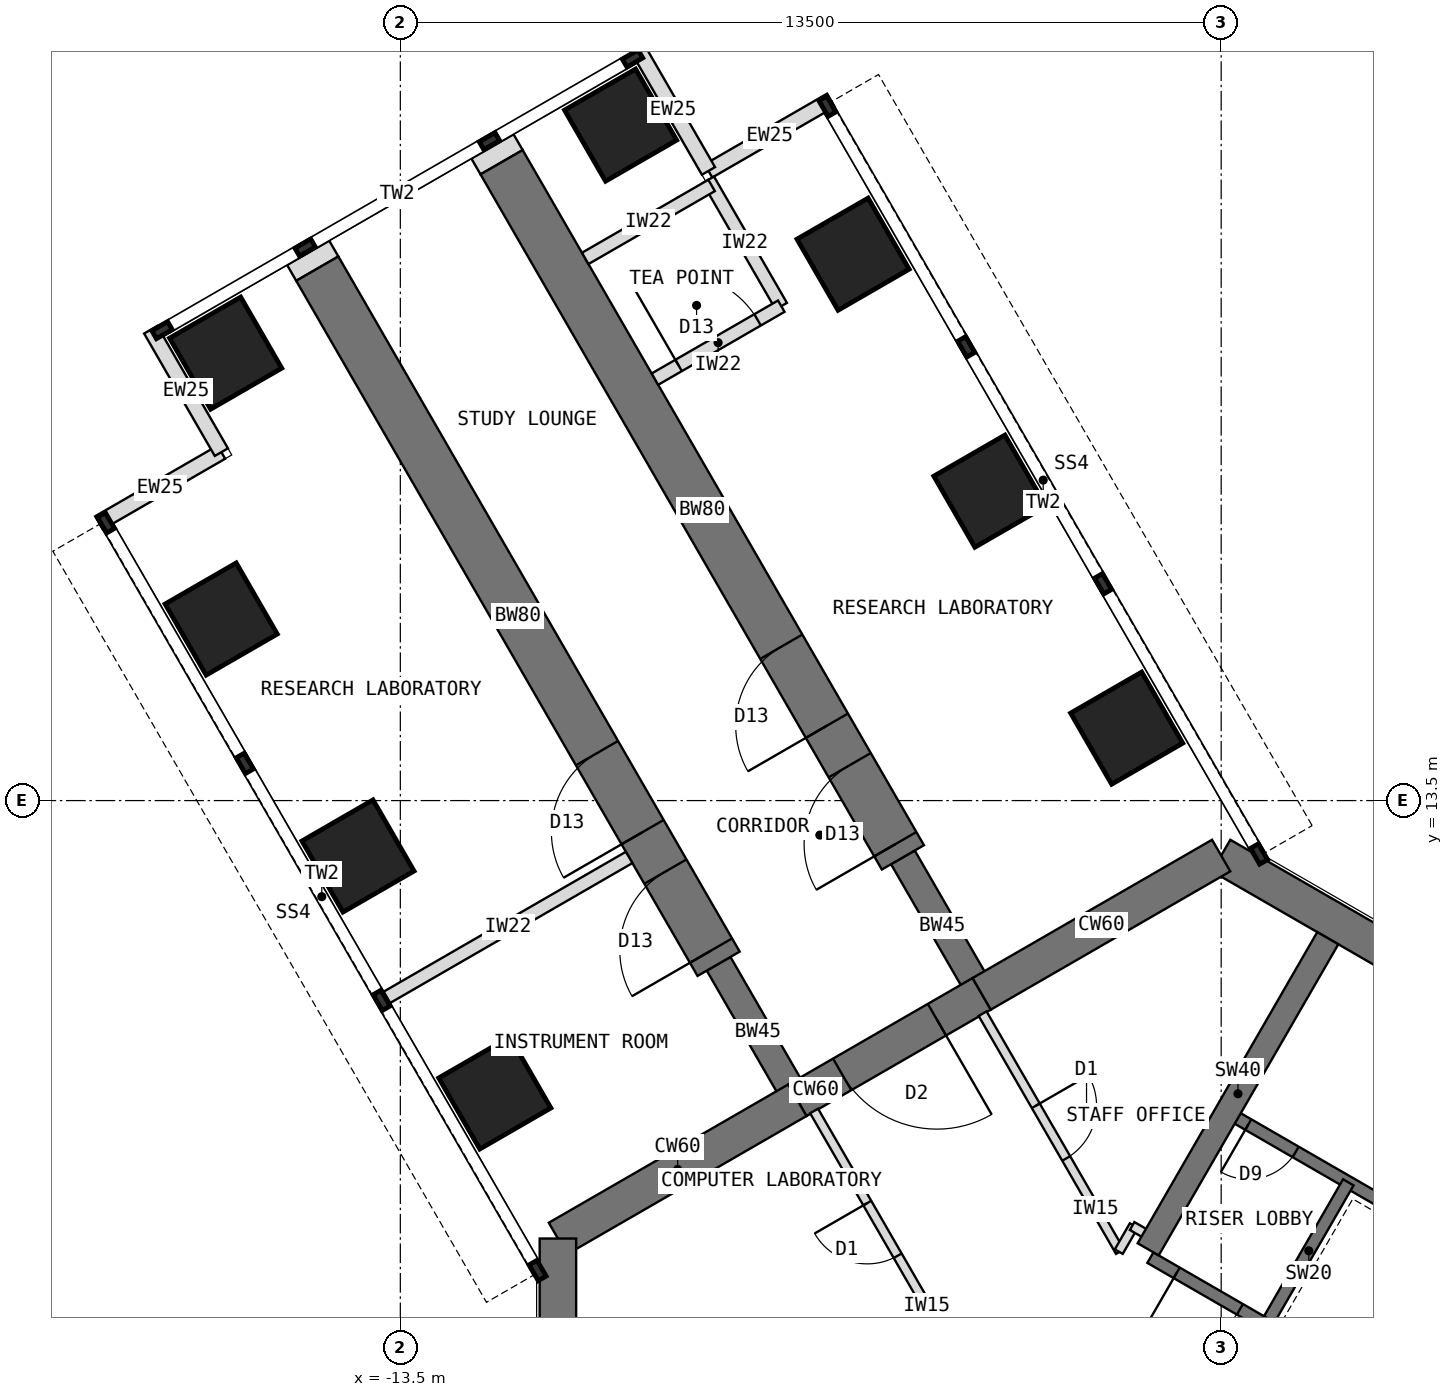
"""IFC4 building model, lengths in metres.
Left out: names, types, materials, properties, quantities, classifications, styles, units other than length and angle.
Written with IfcOpenShell. Run it as: python <this file> out.ifc"""

import sys

from ifc_helpers import new_model, si_unit, direction, frame, frame_2d, origin, origin_2d, place, context, subcontext, project, spatial, rectangle, extrude, element, fill, save


model = new_model("IFC4")
c1 = context("Model", 3, precision=1e-05, world=origin(), true_north=direction((0.0, 1.0)))
c2 = subcontext(c1, "Body", "Model", "MODEL_VIEW")
j1 = project(units=[si_unit("LENGTHUNIT", "METRE"), si_unit("PLANEANGLEUNIT", "RADIAN")], contexts=[c1])
p1 = place(None, origin())
s1 = spatial("IfcSite", under=j1, at=p1, CompositionType="ELEMENT")
p2 = place(p1, origin())
s2 = spatial("IfcBuilding", under=s1, at=p2, CompositionType="ELEMENT")
p3 = place(p2, frame((0.0, 0.0, 101.5)))
s3 = spatial("IfcBuildingStorey", under=s2, at=p3, CompositionType="ELEMENT", Elevation=101.5)
p4 = place(p3, frame((10.908, 6.298, 0.0), z_axis=(0.0, 0.0, 1.0), x_axis=(-0.866021940709, 0.500005998175, 0.0)))
e1 = element("IfcWall", 1, at=p4, inside=s3, PredefinedType="SHEAR", context=c2, shape_type="SweptSolid", body=[
    extrude(rectangle(XDim=12.596, YDim=0.6, at=frame_2d((6.298, 0.0))), origin(), (0.0, 0.0, 1.0), 4.0),
])
p5 = place(p3, frame((0.0, 12.596, 0.0), z_axis=(0.0, 0.0, 1.0), x_axis=(-0.866011268655, -0.500024481964, 0.0)))
e2 = element("IfcWall", 2, at=p5, inside=s3, PredefinedType="SHEAR", context=c2, shape_type="SweptSolid", body=[
    extrude(rectangle(XDim=4.548, YDim=0.6, at=frame_2d((2.274, 0.0))), origin(), (0.0, 0.0, 1.0), 4.0),
])
p6 = place(p3, frame((-3.939, 10.322, 0.0), z_axis=(0.0, 0.0, 1.0), x_axis=(-0.866019471182, -0.500010275428, 0.0)))
e3 = element("IfcWall", 3, at=p6, inside=s3, PredefinedType="SHEAR", context=c2, shape_type="SweptSolid", body=[
    extrude(rectangle(XDim=3.5, YDim=0.6, at=frame_2d((1.75, 0.0))), origin(), (0.0, 0.0, 1.0), 4.0),
])
p7 = place(p6, frame((0.85, 0.0, 0.0)))
e4 = element("IfcOpeningElement", 4, at=p7, cuts=e3, PredefinedType="OPENING", context=c2, shape_type="SweptSolid", body=[
    extrude(rectangle(XDim=1.8, YDim=2.1, at=frame_2d((0.9, 1.05))), frame((0.0, 0.31, 0.0), z_axis=(0.0, -1.0, 0.0), x_axis=(1.0, 0.0, 0.0)), (0.0, 0.0, 1.0), 0.62),
])
p8 = place(p3, frame((-6.97, 8.572, 0.0), z_axis=(0.0, 0.0, 1.0), x_axis=(-0.866034513004, -0.499984222037, 0.0)))
e5 = element("IfcWall", 5, at=p8, inside=s3, PredefinedType="SHEAR", context=c2, shape_type="SweptSolid", body=[
    extrude(rectangle(XDim=4.548, YDim=0.6, at=frame_2d((2.274, 0.0))), origin(), (0.0, 0.0, 1.0), 4.0),
])
p9 = place(p3, frame((-10.908, 6.298, 0.0), z_axis=(0.0, 0.0, 1.0), x_axis=(0.0, -1.0, 0.0)))
e6 = element("IfcWall", 6, at=p9, inside=s3, PredefinedType="SHEAR", context=c2, shape_type="SweptSolid", body=[
    extrude(rectangle(XDim=12.596, YDim=0.6, at=frame_2d((6.298, 0.0))), origin(), (0.0, 0.0, 1.0), 4.0),
])
p10 = place(p3, frame((-6.97, 8.572, 0.0), z_axis=(0.0, 0.0, 1.0), x_axis=(-0.499988811324, 0.866031863473, 0.0)))
e7 = element("IfcWall", 7, at=p10, inside=s3, PredefinedType="SHEAR", context=c2, shape_type="SweptSolid", body=[
    extrude(rectangle(XDim=2.592, YDim=0.45, at=frame_2d((1.296, 0.0))), origin(), (0.0, 0.0, 1.0), 4.0),
])
p11 = place(p3, frame((-8.266, 10.816, 0.0), z_axis=(0.0, 0.0, 1.0), x_axis=(-0.499996231654, 0.866027579429, 0.0)))
e8 = element("IfcWall", 8, at=p11, inside=s3, PredefinedType="SHEAR", context=c2, shape_type="SweptSolid", body=[
    extrude(rectangle(XDim=13.2, YDim=0.8, at=frame_2d((6.6, 0.0))), origin(), (0.0, 0.0, 1.0), 4.0),
])
p12 = place(p11, frame((0.25, 0.0, 0.0)))
e9 = element("IfcOpeningElement", 9, at=p12, cuts=e8, PredefinedType="OPENING", context=c2, shape_type="SweptSolid", body=[
    extrude(rectangle(XDim=1.5, YDim=2.1, at=frame_2d((0.75, 1.05))), frame((0.0, 0.41, 0.0), z_axis=(0.0, -1.0, 0.0), x_axis=(1.0, 0.0, 0.0)), (0.0, 0.0, 1.0), 0.82),
])
p13 = place(p11, frame((2.5, 0.0, 0.0)))
e10 = element("IfcOpeningElement", 10, at=p13, cuts=e8, PredefinedType="OPENING", context=c2, shape_type="SweptSolid", body=[
    extrude(rectangle(XDim=1.5, YDim=2.1, at=frame_2d((0.75, 1.05))), frame((0.0, 0.41, 0.0), z_axis=(0.0, -1.0, 0.0), x_axis=(1.0, 0.0, 0.0)), (0.0, 0.0, 1.0), 0.82),
])
p14 = place(p3, frame((-3.939, 10.322, 0.0), z_axis=(0.0, 0.0, 1.0), x_axis=(-0.499918158782, 0.866072649678, 0.0)))
e11 = element("IfcWall", 11, at=p14, inside=s3, PredefinedType="SHEAR", context=c2, shape_type="SweptSolid", body=[
    extrude(rectangle(XDim=2.592, YDim=0.45, at=frame_2d((1.296, 0.0))), origin(), (0.0, 0.0, 1.0), 4.0),
])
p15 = place(p3, frame((-5.234, 12.566, 0.0), z_axis=(0.0, 0.0, 1.0), x_axis=(-0.500010103361, 0.866019570528, 0.0)))
e12 = element("IfcWall", 12, at=p15, inside=s3, PredefinedType="SHEAR", context=c2, shape_type="SweptSolid", body=[
    extrude(rectangle(XDim=13.2, YDim=0.8, at=frame_2d((6.6, 0.0))), origin(), (0.0, 0.0, 1.0), 4.0),
])
p16 = place(p15, frame((0.25, 0.0, 0.0)))
e13 = element("IfcOpeningElement", 13, at=p16, cuts=e12, PredefinedType="OPENING", context=c2, shape_type="SweptSolid", body=[
    extrude(rectangle(XDim=1.5, YDim=2.1, at=frame_2d((0.75, 1.05))), frame((0.0, 0.41, 0.0), z_axis=(0.0, -1.0, 0.0), x_axis=(1.0, 0.0, 0.0)), (0.0, 0.0, 1.0), 0.82),
])
p17 = place(p15, frame((2.5, 0.0, 0.0)))
e14 = element("IfcOpeningElement", 14, at=p17, cuts=e12, PredefinedType="OPENING", context=c2, shape_type="SweptSolid", body=[
    extrude(rectangle(XDim=1.5, YDim=2.1, at=frame_2d((0.75, 1.05))), frame((0.0, 0.41, 0.0), z_axis=(0.0, -1.0, 0.0), x_axis=(1.0, 0.0, 0.0)), (0.0, 0.0, 1.0), 0.82),
])
for number, where, z_axis, x_axis in (
    (15, (-11.946, 8.691, 0.0), (0.0, 0.0, 1.0), (0.866, 0.5, 0.0)),
    (16, (-1.554, 14.691, 0.0), (0.0, 0.0, 1.0), (0.866, 0.5, 0.0)),
    (17, (-14.196, 12.588, 0.0), (0.0, 0.0, 1.0), (0.866, 0.5, 0.0)),
    (18, (-3.804, 18.588, 0.0), (0.0, 0.0, 1.0), (0.866, 0.5, 0.0)),
    (19, (-16.446, 16.486, 0.0), (0.0, 0.0, 1.0), (0.866, 0.5, 0.0)),
    (20, (-6.054, 22.486, 0.0), (0.0, 0.0, 1.0), (0.866, 0.5, 0.0)),
    (21, (-16.373, 20.858, 0.0), (0.0, 0.0, 1.0), (0.866, 0.5, 0.0)),
    (22, (-9.877, 24.608, 0.0), (0.0, 0.0, 1.0), (0.866, 0.5, 0.0)),
):
    element("IfcColumn", number, at=place(p3, frame(where, z_axis=z_axis, x_axis=x_axis)), inside=s3, PredefinedType="COLUMN", context=c2, shape_type="SweptSolid", body=[
        extrude(rectangle(XDim=1.35, YDim=1.35, at=origin_2d()), origin(), (0.0, 0.0, 1.0), 4.0),
    ])
for number, where, z_axis, x_axis in (
    (23, (-18.456, 18.067, 0.0), (0.0, 0.0, 1.0), (0.866, 0.5, 0.0)),
    (24, (-16.443, 19.23, 0.0), (0.0, 0.0, 1.0), (-0.5, 0.866, 0.0)),
    (25, (-6.419, 25.017, 0.0), (0.0, 0.0, 1.0), (-0.866, -0.5, 0.0)),
    (26, (-8.432, 23.855, 0.0), (0.0, 0.0, 1.0), (-0.5, 0.866, 0.0)),
):
    element("IfcWall", number, at=place(p3, frame(where, z_axis=z_axis, x_axis=x_axis)), inside=s3, PredefinedType="STANDARD", context=c2, shape_type="SweptSolid", body=[
        extrude(rectangle(XDim=2.325, YDim=0.25, at=frame_2d((1.163, 0.0))), origin(), (0.0, 0.0, 1.0), 3.8),
    ])
p18 = place(p3, frame((-14.865, 22.248, 0.0), z_axis=(0.0, 0.0, 1.0), x_axis=(-0.500426713919, 0.865778900179, 0.0)))
e27 = element("IfcWall", 27, at=p18, inside=s3, PredefinedType="PARTITIONING", context=c2, shape_type="SweptSolid", body=[
    extrude(rectangle(XDim=0.3, YDim=0.8, at=frame_2d((0.15, 0.0))), origin(), (0.0, 0.0, 1.0), 3.8),
])
p19 = place(p3, frame((-11.834, 23.998, 0.0), z_axis=(0.0, 0.0, 1.0), x_axis=(-0.499816412211, 0.866131372301, 0.0)))
e28 = element("IfcWall", 28, at=p19, inside=s3, PredefinedType="PARTITIONING", context=c2, shape_type="SweptSolid", body=[
    extrude(rectangle(XDim=0.3, YDim=0.8, at=frame_2d((0.15, 0.0))), origin(), (0.0, 0.0, 1.0), 3.8),
])
p20 = place(p3, frame((5.764, 1.984, 0.0), z_axis=(0.0, 0.0, 1.0), x_axis=(-0.866026010844, 0.49999894854, 0.0)))
e29 = element("IfcWall", 29, at=p20, inside=s3, PredefinedType="SHEAR", context=c2, shape_type="SweptSolid", body=[
    extrude(rectangle(XDim=8.0, YDim=0.2, at=frame_2d((4.0, 0.0))), origin(), (0.0, 0.0, 1.0), 4.0),
])
p21 = place(p20, frame((6.3, 0.0, 0.0)))
e30 = element("IfcOpeningElement", 30, at=p21, cuts=e29, PredefinedType="OPENING", context=c2, shape_type="SweptSolid", body=[
    extrude(rectangle(XDim=1.2, YDim=2.1, at=frame_2d((0.6, 1.05))), frame((0.0, 0.11, 0.0), z_axis=(0.0, -1.0, 0.0), x_axis=(1.0, 0.0, 0.0)), (0.0, 0.0, 1.0), 0.22),
])
p22 = place(p3, frame((0.791, 4.97, 0.0), z_axis=(0.0, 0.0, 1.0), x_axis=(0.499936506574, 0.866062058628, 0.0)))
e31 = element("IfcWall", 31, at=p22, inside=s3, PredefinedType="SHEAR", context=c2, shape_type="SweptSolid", body=[
    extrude(rectangle(XDim=2.6, YDim=0.2, at=frame_2d((1.3, 0.0))), origin(), (0.0, 0.0, 1.0), 4.0),
])
p23 = place(p3, frame((7.114, 4.322, 0.0), z_axis=(0.0, 0.0, 1.0), x_axis=(-0.866026010844, 0.49999894854, 0.0)))
e32 = element("IfcWall", 32, at=p23, inside=s3, PredefinedType="SHEAR", context=c2, shape_type="SweptSolid", body=[
    extrude(rectangle(XDim=8.0, YDim=0.2, at=frame_2d((4.0, 0.0))), origin(), (0.0, 0.0, 1.0), 4.0),
])
p24 = place(p23, frame((6.8, 0.0, 0.0)))
e33 = element("IfcOpeningElement", 33, at=p24, cuts=e32, PredefinedType="OPENING", context=c2, shape_type="SweptSolid", body=[
    extrude(rectangle(XDim=0.9, YDim=2.1, at=frame_2d((0.45, 1.05))), frame((0.0, 0.11, 0.0), z_axis=(0.0, -1.0, 0.0), x_axis=(1.0, 0.0, 0.0)), (0.0, 0.0, 1.0), 0.22),
])
p25 = place(p3, frame((-1.201, 6.12, 0.0), z_axis=(0.0, 0.0, 1.0), x_axis=(0.49999668571, 0.866027317282, 0.0)))
e34 = element("IfcWall", 34, at=p25, inside=s3, PredefinedType="SHEAR", context=c2, shape_type="SweptSolid", body=[
    extrude(rectangle(XDim=5.908, YDim=0.4, at=frame_2d((2.954, 0.0))), origin(), (0.0, 0.0, 1.0), 4.0),
])
p26 = place(p3, frame((-9.737, 12.565, 0.0), z_axis=(0.0, 0.0, 1.0), x_axis=(-0.866016770315, -0.500014953309, 0.0)))
e35 = element("IfcWall", 35, at=p26, inside=s3, PredefinedType="PARTITIONING", context=c2, shape_type="SweptSolid", body=[
    extrude(rectangle(XDim=4.6, YDim=0.215, at=frame_2d((2.3, 0.0))), origin(), (0.0, 0.0, 1.0), 3.8),
])
p27 = place(p3, frame((-7.235, 21.631, 0.0), z_axis=(0.0, 0.0, 1.0), x_axis=(-0.499957262057, 0.866050077142, 0.0)))
e36 = element("IfcWall", 36, at=p27, inside=s3, PredefinedType="PARTITIONING", context=c2, shape_type="SweptSolid", body=[
    extrude(rectangle(XDim=2.4, YDim=0.215, at=frame_2d((1.2, 0.0))), origin(), (0.0, 0.0, 1.0), 3.8),
])
p28 = place(p3, frame((-9.313, 20.431, 0.0), z_axis=(0.0, 0.0, 1.0), x_axis=(0.866024647952, 0.500001309137, 0.0)))
e37 = element("IfcWall", 37, at=p28, inside=s3, PredefinedType="PARTITIONING", context=c2, shape_type="SweptSolid", body=[
    extrude(rectangle(XDim=2.4, YDim=0.215, at=frame_2d((1.2, 0.0))), origin(), (0.0, 0.0, 1.0), 3.8),
])
p29 = place(p28, frame((0.45, 0.0, 0.0)))
e38 = element("IfcOpeningElement", 38, at=p29, cuts=e37, PredefinedType="OPENING", context=c2, shape_type="SweptSolid", body=[
    extrude(rectangle(XDim=1.5, YDim=2.1, at=frame_2d((0.75, 1.05))), frame((0.0, 0.117, 0.0), z_axis=(0.0, -1.0, 0.0), x_axis=(1.0, 0.0, 0.0)), (0.0, 0.0, 1.0), 0.235),
])
p30 = place(p3, frame((-10.459, 22.416, 0.0), z_axis=(0.0, 0.0, 1.0), x_axis=(0.866024647952, 0.500001309137, 0.0)))
e39 = element("IfcWall", 39, at=p30, inside=s3, PredefinedType="PARTITIONING", context=c2, shape_type="SweptSolid", body=[
    extrude(rectangle(XDim=2.4, YDim=0.215, at=frame_2d((1.2, 0.0))), origin(), (0.0, 0.0, 1.0), 3.8),
])
p31 = place(p3, frame((-4.436, 4.483, 0.0), z_axis=(0.0, 0.0, 1.0), x_axis=(-0.500009315796, 0.86602002524, 0.0)))
e40 = element("IfcWall", 40, at=p31, inside=s3, PredefinedType="PARTITIONING", context=c2, shape_type="SweptSolid", body=[
    extrude(rectangle(XDim=4.519, YDim=0.15, at=frame_2d((2.259, 0.0))), origin(), (0.0, 0.0, 1.0), 3.8),
])
p32 = place(p31, frame((1.769, 0.0, 0.0)))
e41 = element("IfcOpeningElement", 41, at=p32, cuts=e40, PredefinedType="OPENING", context=c2, shape_type="SweptSolid", body=[
    extrude(rectangle(XDim=1.0, YDim=2.1, at=frame_2d((0.5, 1.05))), frame((0.0, 0.085, 0.0), z_axis=(0.0, -1.0, 0.0), x_axis=(1.0, 0.0, 0.0)), (0.0, 0.0, 1.0), 0.17),
])
p33 = place(p3, frame((-3.924, 9.996, 0.0), z_axis=(0.0, 0.0, 1.0), x_axis=(0.500032713409, -0.866006515865, 0.0)))
e42 = element("IfcWall", 42, at=p33, inside=s3, PredefinedType="PARTITIONING", context=c2, shape_type="SweptSolid", body=[
    extrude(rectangle(XDim=4.518, YDim=0.15, at=frame_2d((2.259, 0.0))), origin(), (0.0, 0.0, 1.0), 3.8),
])
p34 = place(p33, frame((1.749, 0.0, 0.0)))
e43 = element("IfcOpeningElement", 43, at=p34, cuts=e42, PredefinedType="OPENING", context=c2, shape_type="SweptSolid", body=[
    extrude(rectangle(XDim=1.0, YDim=2.1, at=frame_2d((0.5, 1.05))), frame((0.0, 0.085, 0.0), z_axis=(0.0, -1.0, 0.0), x_axis=(1.0, 0.0, 0.0)), (0.0, 0.0, 1.0), 0.17),
])
p35 = place(p3, frame((-1.684, 6.083, 0.0), z_axis=(0.0, 0.0, 1.0), x_axis=(0.50033519877, 0.865831790172, 0.0)))
e44 = element("IfcWall", 44, at=p35, inside=s3, PredefinedType="PARTITIONING", context=c2, shape_type="SweptSolid", body=[
    extrude(rectangle(XDim=0.494, YDim=0.15, at=frame_2d((0.247, 0.0))), origin(), (0.0, 0.0, 1.0), 3.8),
])
p36 = place(p3, frame((-1.464, 6.503, 0.0), z_axis=(0.0, 0.0, 1.0), x_axis=(0.866138304741, -0.499804398801, 0.0)))
e45 = element("IfcWall", 45, at=p36, inside=s3, PredefinedType="PARTITIONING", context=c2, shape_type="SweptSolid", body=[
    extrude(rectangle(XDim=0.43, YDim=0.15, at=frame_2d((0.215, 0.0))), origin(), (0.0, 0.0, 1.0), 3.8),
])
p37 = place(p21, origin())
e46 = element("IfcDoor", 46, at=p37, inside=s3, OperationType="SINGLE_SWING_RIGHT", PredefinedType="DOOR", context=c2, shape_type="SweptSolid", body=[
    extrude(rectangle(XDim=1.2, YDim=2.1, at=frame_2d((0.6, 1.05))), frame((0.0, 0.025, 0.0), z_axis=(0.0, -1.0, 0.0), x_axis=(1.0, 0.0, 0.0)), (0.0, 0.0, 1.0), 0.05),
])
fill(e30, e46)
p38 = place(p24, origin())
e47 = element("IfcDoor", 47, at=p38, inside=s3, OperationType="SINGLE_SWING_RIGHT", PredefinedType="DOOR", context=c2, shape_type="SweptSolid", body=[
    extrude(rectangle(XDim=0.9, YDim=2.1, at=frame_2d((0.45, 1.05))), frame((0.0, 0.025, 0.0), z_axis=(0.0, -1.0, 0.0), x_axis=(1.0, 0.0, 0.0)), (0.0, 0.0, 1.0), 0.05),
])
fill(e33, e47)
p39 = place(p7, origin())
e48 = element("IfcDoor", 48, at=p39, inside=s3, OperationType="DOUBLE_DOOR_DOUBLE_SWING", PredefinedType="DOOR", context=c2, shape_type="SweptSolid", body=[
    extrude(rectangle(XDim=1.72, YDim=2.06, at=frame_2d((0.9, 1.03))), frame((0.0, 0.025, 0.0), z_axis=(0.0, -1.0, 0.0), x_axis=(1.0, 0.0, 0.0)), (0.0, 0.0, 1.0), 0.05),
    extrude(rectangle(XDim=0.04, YDim=2.1, at=frame_2d((0.02, 1.05))), frame((0.0, 0.3, 0.0), z_axis=(0.0, -1.0, 0.0), x_axis=(1.0, 0.0, 0.0)), (0.0, 0.0, 1.0), 0.6),
    extrude(rectangle(XDim=0.04, YDim=2.1, at=frame_2d((1.78, 1.05))), frame((0.0, 0.3, 0.0), z_axis=(0.0, -1.0, 0.0), x_axis=(1.0, 0.0, 0.0)), (0.0, 0.0, 1.0), 0.6),
    extrude(rectangle(XDim=1.72, YDim=0.04, at=frame_2d((0.9, 2.08))), frame((0.0, 0.3, 0.0), z_axis=(0.0, -1.0, 0.0), x_axis=(1.0, 0.0, 0.0)), (0.0, 0.0, 1.0), 0.6),
])
fill(e4, e48)
p40 = place(p29, origin())
e49 = element("IfcDoor", 49, at=p40, inside=s3, OperationType="DOUBLE_DOOR_SINGLE_SWING", PredefinedType="DOOR", context=c2, shape_type="SweptSolid", body=[
    extrude(rectangle(XDim=1.5, YDim=2.1, at=frame_2d((0.75, 1.05))), frame((0.0, 0.025, 0.0), z_axis=(0.0, -1.0, 0.0), x_axis=(1.0, 0.0, 0.0)), (0.0, 0.0, 1.0), 0.05),
])
fill(e38, e49)
p41 = place(p34, origin())
e50 = element("IfcDoor", 50, at=p41, inside=s3, OperationType="SINGLE_SWING_LEFT", PredefinedType="DOOR", context=c2, shape_type="SweptSolid", body=[
    extrude(rectangle(XDim=1.0, YDim=2.1, at=frame_2d((0.5, 1.05))), frame((0.0, 0.025, 0.0), z_axis=(0.0, -1.0, 0.0), x_axis=(1.0, 0.0, 0.0)), (0.0, 0.0, 1.0), 0.05),
])
fill(e43, e50)
p42 = place(p32, origin())
e51 = element("IfcDoor", 51, at=p42, inside=s3, OperationType="SINGLE_SWING_RIGHT", PredefinedType="DOOR", context=c2, shape_type="SweptSolid", body=[
    extrude(rectangle(XDim=1.0, YDim=2.1, at=frame_2d((0.5, 1.05))), frame((0.0, 0.025, 0.0), z_axis=(0.0, -1.0, 0.0), x_axis=(1.0, 0.0, 0.0)), (0.0, 0.0, 1.0), 0.05),
])
fill(e41, e51)
p43 = place(p12, origin())
e52 = element("IfcDoor", 52, at=p43, inside=s3, OperationType="DOUBLE_DOOR_SINGLE_SWING", PredefinedType="DOOR", context=c2, shape_type="SweptSolid", body=[
    extrude(rectangle(XDim=1.42, YDim=2.06, at=frame_2d((0.75, 1.03))), frame((0.0, 0.025, 0.0), z_axis=(0.0, -1.0, 0.0), x_axis=(1.0, 0.0, 0.0)), (0.0, 0.0, 1.0), 0.05),
    extrude(rectangle(XDim=0.04, YDim=2.1, at=frame_2d((0.02, 1.05))), frame((0.0, 0.4, 0.0), z_axis=(0.0, -1.0, 0.0), x_axis=(1.0, 0.0, 0.0)), (0.0, 0.0, 1.0), 0.8),
    extrude(rectangle(XDim=0.04, YDim=2.1, at=frame_2d((1.48, 1.05))), frame((0.0, 0.4, 0.0), z_axis=(0.0, -1.0, 0.0), x_axis=(1.0, 0.0, 0.0)), (0.0, 0.0, 1.0), 0.8),
    extrude(rectangle(XDim=1.42, YDim=0.04, at=frame_2d((0.75, 2.08))), frame((0.0, 0.4, 0.0), z_axis=(0.0, -1.0, 0.0), x_axis=(1.0, 0.0, 0.0)), (0.0, 0.0, 1.0), 0.8),
])
fill(e9, e52)
p44 = place(p13, origin())
e53 = element("IfcDoor", 53, at=p44, inside=s3, OperationType="DOUBLE_DOOR_SINGLE_SWING", PredefinedType="DOOR", context=c2, shape_type="SweptSolid", body=[
    extrude(rectangle(XDim=1.42, YDim=2.06, at=frame_2d((0.75, 1.03))), frame((0.0, 0.025, 0.0), z_axis=(0.0, -1.0, 0.0), x_axis=(1.0, 0.0, 0.0)), (0.0, 0.0, 1.0), 0.05),
    extrude(rectangle(XDim=0.04, YDim=2.1, at=frame_2d((0.02, 1.05))), frame((0.0, 0.4, 0.0), z_axis=(0.0, -1.0, 0.0), x_axis=(1.0, 0.0, 0.0)), (0.0, 0.0, 1.0), 0.8),
    extrude(rectangle(XDim=0.04, YDim=2.1, at=frame_2d((1.48, 1.05))), frame((0.0, 0.4, 0.0), z_axis=(0.0, -1.0, 0.0), x_axis=(1.0, 0.0, 0.0)), (0.0, 0.0, 1.0), 0.8),
    extrude(rectangle(XDim=1.42, YDim=0.04, at=frame_2d((0.75, 2.08))), frame((0.0, 0.4, 0.0), z_axis=(0.0, -1.0, 0.0), x_axis=(1.0, 0.0, 0.0)), (0.0, 0.0, 1.0), 0.8),
])
fill(e10, e53)
p45 = place(p16, origin())
e54 = element("IfcDoor", 54, at=p45, inside=s3, OperationType="DOUBLE_DOOR_SINGLE_SWING", PredefinedType="DOOR", context=c2, shape_type="SweptSolid", body=[
    extrude(rectangle(XDim=1.42, YDim=2.06, at=frame_2d((0.75, 1.03))), frame((0.0, 0.025, 0.0), z_axis=(0.0, -1.0, 0.0), x_axis=(1.0, 0.0, 0.0)), (0.0, 0.0, 1.0), 0.05),
    extrude(rectangle(XDim=0.04, YDim=2.1, at=frame_2d((0.02, 1.05))), frame((0.0, 0.4, 0.0), z_axis=(0.0, -1.0, 0.0), x_axis=(1.0, 0.0, 0.0)), (0.0, 0.0, 1.0), 0.8),
    extrude(rectangle(XDim=0.04, YDim=2.1, at=frame_2d((1.48, 1.05))), frame((0.0, 0.4, 0.0), z_axis=(0.0, -1.0, 0.0), x_axis=(1.0, 0.0, 0.0)), (0.0, 0.0, 1.0), 0.8),
    extrude(rectangle(XDim=1.42, YDim=0.04, at=frame_2d((0.75, 2.08))), frame((0.0, 0.4, 0.0), z_axis=(0.0, -1.0, 0.0), x_axis=(1.0, 0.0, 0.0)), (0.0, 0.0, 1.0), 0.8),
])
fill(e13, e54)
p46 = place(p17, origin())
e55 = element("IfcDoor", 55, at=p46, inside=s3, OperationType="DOUBLE_DOOR_SINGLE_SWING", PredefinedType="DOOR", context=c2, shape_type="SweptSolid", body=[
    extrude(rectangle(XDim=1.42, YDim=2.06, at=frame_2d((0.75, 1.03))), frame((0.0, 0.025, 0.0), z_axis=(0.0, -1.0, 0.0), x_axis=(1.0, 0.0, 0.0)), (0.0, 0.0, 1.0), 0.05),
    extrude(rectangle(XDim=0.04, YDim=2.1, at=frame_2d((0.02, 1.05))), frame((0.0, 0.4, 0.0), z_axis=(0.0, -1.0, 0.0), x_axis=(1.0, 0.0, 0.0)), (0.0, 0.0, 1.0), 0.8),
    extrude(rectangle(XDim=0.04, YDim=2.1, at=frame_2d((1.48, 1.05))), frame((0.0, 0.4, 0.0), z_axis=(0.0, -1.0, 0.0), x_axis=(1.0, 0.0, 0.0)), (0.0, 0.0, 1.0), 0.8),
    extrude(rectangle(XDim=1.42, YDim=0.04, at=frame_2d((0.75, 2.08))), frame((0.0, 0.4, 0.0), z_axis=(0.0, -1.0, 0.0), x_axis=(1.0, 0.0, 0.0)), (0.0, 0.0, 1.0), 0.8),
])
fill(e14, e55)
save(model, sys.argv[1])
